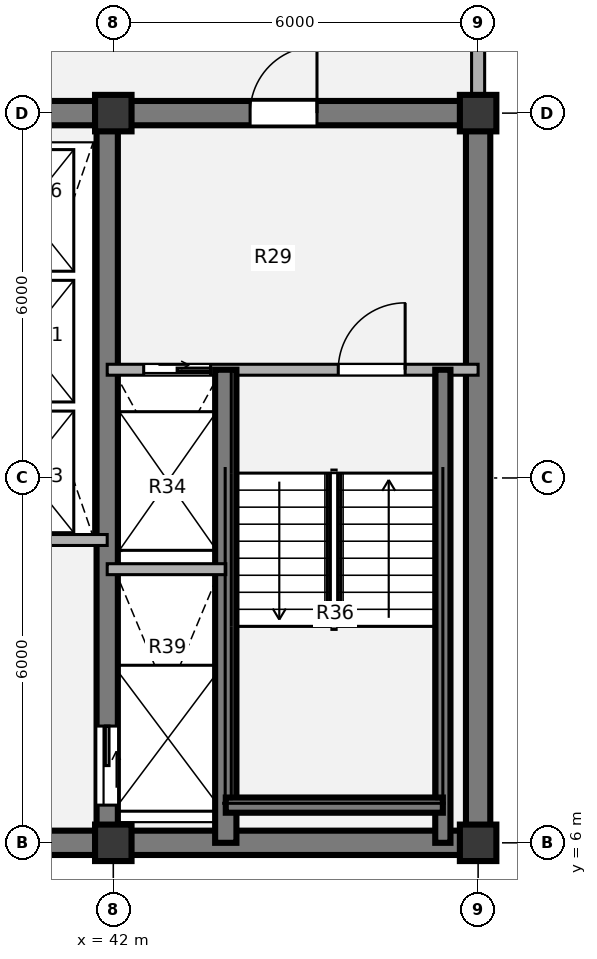
"""IFC4 building model, lengths in metres.
Left out: names, types, materials, properties, quantities, classifications, styles, units other than length and angle.
Written with IfcOpenShell. Run it as: python <this file> out.ifc"""

import sys

from ifc_helpers import new_model, si_unit, direction, frame, frame_2d, origin, origin_2d, place, context, subcontext, project, spatial, rectangle, extrude, source, transform, mapped, element, fill, save


model = new_model("IFC4")
c1 = context("Model", 3, precision=1e-05, world=origin(), true_north=direction((0.0, 1.0)))
c2 = subcontext(c1, "Body", "Model", "MODEL_VIEW")
j1 = project(units=[si_unit("LENGTHUNIT", "METRE"), si_unit("PLANEANGLEUNIT", "RADIAN")], contexts=[c1])
p1 = place(None, origin())
s1 = spatial("IfcSite", under=j1, at=p1, CompositionType="ELEMENT")
p2 = place(p1, origin())
s2 = spatial("IfcBuilding", under=s1, at=p2, CompositionType="ELEMENT")
p3 = place(p2, frame((0.0, 0.0, 230.58)))
s3 = spatial("IfcBuildingStorey", under=s2, at=p3, CompositionType="ELEMENT", Elevation=230.58)
m1 = source(origin(), c2, "Body", "SweptSolid", [
    extrude(rectangle(XDim=0.6, YDim=0.6, at=origin_2d()), origin(), (0.0, 0.0, 1.0), 3.78),
])
for number, where, z_axis, x_axis in (
    (1, (42.0, 6.0, 0.0), (0.0, 0.0, 1.0), (1.0, 0.0, 0.0)),
    (2, (48.0, 6.0, 0.0), (0.0, 0.0, 1.0), (1.0, 0.0, 0.0)),
    (3, (42.0, 18.0, 0.0), (0.0, 0.0, 1.0), (1.0, 0.0, 0.0)),
    (4, (48.0, 18.0, 0.0), (0.0, 0.0, 1.0), (1.0, 0.0, 0.0)),
):
    element("IfcColumn", number, at=place(p3, frame(where, z_axis=z_axis, x_axis=x_axis)), inside=s3, PredefinedType="COLUMN", context=c2, shape_type="MappedRepresentation", body=[
        mapped(m1, transform((0.0, 0.0, 0.0), x_axis=(1.0, 0.0, 0.0), y_axis=(0.0, 1.0, 0.0), z_axis=(0.0, 0.0, 1.0), scale=1.0)),
    ])
p4 = place(p3, frame((48.2, 6.0, 0.0), z_axis=(0.0, 0.0, 1.0), x_axis=(-1.0, 0.0, 0.0)))
e5 = element("IfcWall", 5, at=p4, inside=s3, PredefinedType="SHEAR", context=c2, shape_type="SweptSolid", body=[
    extrude(rectangle(XDim=24.4, YDim=0.4, at=frame_2d((12.2, 0.0))), origin(), (0.0, 0.0, 1.0), 3.78),
])
p5 = place(p3, frame((48.0, 18.0, 0.0), z_axis=(0.0, 0.0, 1.0), x_axis=(0.0, -1.0, 0.0)))
e6 = element("IfcWall", 6, at=p5, inside=s3, PredefinedType="SHEAR", context=c2, shape_type="SweptSolid", body=[
    extrude(rectangle(XDim=12.0, YDim=0.4, at=frame_2d((6.0, 0.0))), origin(), (0.0, 0.0, 1.0), 3.78),
])
p6 = place(p3, frame((38.8, 18.0, 0.0), z_axis=(0.0, 0.0, 1.0), x_axis=(1.0, 0.0, 0.0)))
e7 = element("IfcWall", 7, at=p6, inside=s3, PredefinedType="SHEAR", context=c2, shape_type="SweptSolid", body=[
    extrude(rectangle(XDim=9.4, YDim=0.4, at=frame_2d((4.7, 0.0))), origin(), (0.0, 0.0, 1.0), 3.78),
])
p7 = place(p6, frame((5.45, 0.0, 0.0)))
e8 = element("IfcOpeningElement", 8, at=p7, cuts=e7, PredefinedType="OPENING", context=c2, shape_type="SweptSolid", body=[
    extrude(rectangle(XDim=1.1, YDim=2.1, at=origin_2d()), frame((0.55, 0.21, 1.05), z_axis=(0.0, -1.0, 0.0), x_axis=(1.0, 0.0, 0.0)), (0.0, 0.0, 1.0), 0.42),
])
p8 = place(p3, frame((41.9, 18.0, 0.0), z_axis=(0.0, 0.0, 1.0), x_axis=(0.0, -1.0, 0.0)))
e9 = element("IfcWall", 9, at=p8, inside=s3, PredefinedType="SHEAR", context=c2, shape_type="SweptSolid", body=[
    extrude(rectangle(XDim=12.0, YDim=0.35, at=frame_2d((6.0, 0.0))), origin(), (0.0, 0.0, 1.0), 3.78),
])
p9 = place(p8, frame((10.08, 0.0, 0.0)))
e10 = element("IfcOpeningElement", 10, at=p9, cuts=e9, PredefinedType="OPENING", context=c2, shape_type="SweptSolid", body=[
    extrude(rectangle(XDim=1.3, YDim=2.1, at=origin_2d()), frame((0.65, 0.185, 1.05), z_axis=(0.0, -1.0, 0.0), x_axis=(1.0, 0.0, 0.0)), (0.0, 0.0, 1.0), 0.37),
])
p10 = place(p3, frame((48.0, 21.05, 0.0), z_axis=(0.0, 0.0, 1.0), x_axis=(0.0, -1.0, 0.0)))
e11 = element("IfcWall", 11, at=p10, inside=s3, PredefinedType="SOLIDWALL", context=c2, shape_type="SweptSolid", body=[
    extrude(rectangle(XDim=2.77, YDim=0.215, at=frame_2d((1.385, 0.0))), origin(), (0.0, 0.0, 1.0), 2.718),
])
p11 = place(p3, frame((39.35, 10.98, 0.0), z_axis=(0.0, 0.0, 1.0), x_axis=(1.0, 0.0, 0.0)))
e12 = element("IfcWall", 12, at=p11, inside=s3, PredefinedType="PARTITIONING", context=c2, shape_type="SweptSolid", body=[
    extrude(rectangle(XDim=2.55, YDim=0.18, at=frame_2d((1.275, 0.0))), origin(), (0.0, 0.0, 1.0), 3.5),
])
p12 = place(p3, frame((41.9, 13.78, 0.0), z_axis=(0.0, 0.0, 1.0), x_axis=(1.0, 0.0, 0.0)))
e13 = element("IfcWall", 13, at=p12, inside=s3, PredefinedType="PARTITIONING", context=c2, shape_type="SweptSolid", body=[
    extrude(rectangle(XDim=6.1, YDim=0.18, at=frame_2d((3.05, 0.0))), origin(), (0.0, 0.0, 1.0), 3.5),
])
p13 = place(p12, frame((0.6, 0.0, 0.0)))
e14 = element("IfcOpeningElement", 14, at=p13, cuts=e13, PredefinedType="OPENING", context=c2, shape_type="SweptSolid", body=[
    extrude(rectangle(XDim=1.1, YDim=2.1, at=origin_2d()), frame((0.55, 0.1, 1.05), z_axis=(0.0, -1.0, 0.0), x_axis=(1.0, 0.0, 0.0)), (0.0, 0.0, 1.0), 0.2),
])
p14 = place(p12, frame((3.8, 0.0, 0.0)))
e15 = element("IfcOpeningElement", 15, at=p14, cuts=e13, PredefinedType="OPENING", context=c2, shape_type="SweptSolid", body=[
    extrude(rectangle(XDim=1.1, YDim=2.1, at=origin_2d()), frame((0.55, 0.1, 1.05), z_axis=(0.0, -1.0, 0.0), x_axis=(1.0, 0.0, 0.0)), (0.0, 0.0, 1.0), 0.2),
])
p15 = place(p3, frame((43.85, 6.0, 0.0), z_axis=(0.0, 0.0, 1.0), x_axis=(0.0, 1.0, 0.0)))
e16 = element("IfcWall", 16, at=p15, inside=s3, PredefinedType="SHEAR", context=c2, shape_type="SweptSolid", body=[
    extrude(rectangle(XDim=7.78, YDim=0.35, at=frame_2d((3.89, 0.0))), origin(), (0.0, 0.0, 1.0), 3.85),
])
p16 = place(p3, frame((47.42, 6.0, 0.0), z_axis=(0.0, 0.0, 1.0), x_axis=(0.0, 1.0, 0.0)))
e17 = element("IfcWall", 17, at=p16, inside=s3, PredefinedType="SHEAR", context=c2, shape_type="SweptSolid", body=[
    extrude(rectangle(XDim=7.78, YDim=0.25, at=frame_2d((3.89, 0.0))), origin(), (0.0, 0.0, 1.0), 3.85),
])
p17 = place(p3, frame((43.85, 6.62, 0.0), z_axis=(0.0, 0.0, 1.0), x_axis=(1.0, 0.0, 0.0)))
e18 = element("IfcWall", 18, at=p17, inside=s3, PredefinedType="SHEAR", context=c2, shape_type="SweptSolid", body=[
    extrude(rectangle(XDim=3.57, YDim=0.25, at=frame_2d((1.785, 0.0))), origin(), (0.0, 0.0, 1.0), 3.85),
])
p18 = place(p3, frame((41.9, 10.5, 0.0), z_axis=(0.0, 0.0, 1.0), x_axis=(1.0, 0.0, 0.0)))
e19 = element("IfcWall", 19, at=p18, inside=s3, PredefinedType="PARTITIONING", context=c2, shape_type="SweptSolid", body=[
    extrude(rectangle(XDim=1.95, YDim=0.18, at=frame_2d((0.975, 0.0))), origin(), (0.0, 0.0, 1.0), 3.5),
])
m2 = source(origin(), c2, "Body", "SweptSolid", [
    extrude(rectangle(XDim=1.1, YDim=2.1, at=origin_2d()), frame((0.55, 0.025, 1.05), z_axis=(0.0, -1.0, 0.0), x_axis=(1.0, 0.0, 0.0)), (0.0, 0.0, 1.0), 0.05),
])
p19 = place(p13, origin())
e20 = element("IfcDoor", 20, at=p19, inside=s3, OperationType="SLIDING_TO_RIGHT", PredefinedType="DOOR", context=c2, shape_type="MappedRepresentation", body=[
    mapped(m2, transform((0.0, 0.0, 0.0), x_axis=(1.0, 0.0, 0.0), y_axis=(0.0, 1.0, 0.0), z_axis=(0.0, 0.0, 1.0), scale=1.0)),
])
fill(e14, e20)
m3 = source(origin(), c2, "Body", "SweptSolid", [
    extrude(rectangle(XDim=1.1, YDim=2.1, at=origin_2d()), frame((0.55, 0.025, 1.05), z_axis=(0.0, -1.0, 0.0), x_axis=(1.0, 0.0, 0.0)), (0.0, 0.0, 1.0), 0.05),
])
p20 = place(p14, origin())
e21 = element("IfcDoor", 21, at=p20, inside=s3, OperationType="SINGLE_SWING_RIGHT", PredefinedType="DOOR", context=c2, shape_type="MappedRepresentation", body=[
    mapped(m3, transform((0.0, 0.0, 0.0), x_axis=(1.0, 0.0, 0.0), y_axis=(0.0, 1.0, 0.0), z_axis=(0.0, 0.0, 1.0), scale=1.0)),
])
fill(e15, e21)
m4 = source(origin(), c2, "Body", "SweptSolid", [
    extrude(rectangle(XDim=1.3, YDim=2.1, at=origin_2d()), frame((0.65, 0.025, 1.05), z_axis=(0.0, -1.0, 0.0), x_axis=(1.0, 0.0, 0.0)), (0.0, 0.0, 1.0), 0.05),
])
p21 = place(p9, origin())
e22 = element("IfcDoor", 22, at=p21, inside=s3, OperationType="SLIDING_TO_LEFT", PredefinedType="DOOR", context=c2, shape_type="MappedRepresentation", body=[
    mapped(m4, transform((0.0, 0.0, 0.0), x_axis=(1.0, 0.0, 0.0), y_axis=(0.0, 1.0, 0.0), z_axis=(0.0, 0.0, 1.0), scale=1.0)),
])
fill(e10, e22)
m5 = source(origin(), c2, "Body", "SweptSolid", [
    extrude(rectangle(XDim=1.1, YDim=2.1, at=origin_2d()), frame((0.55, 0.025, 1.05), z_axis=(0.0, -1.0, 0.0), x_axis=(1.0, 0.0, 0.0)), (0.0, 0.0, 1.0), 0.05),
])
p22 = place(p7, origin())
e23 = element("IfcDoor", 23, at=p22, inside=s3, OperationType="SINGLE_SWING_RIGHT", PredefinedType="DOOR", context=c2, shape_type="MappedRepresentation", body=[
    mapped(m5, transform((0.0, 0.0, 0.0), x_axis=(1.0, 0.0, 0.0), y_axis=(0.0, 1.0, 0.0), z_axis=(0.0, 0.0, 1.0), scale=1.0)),
])
fill(e8, e23)
save(model, sys.argv[1])
